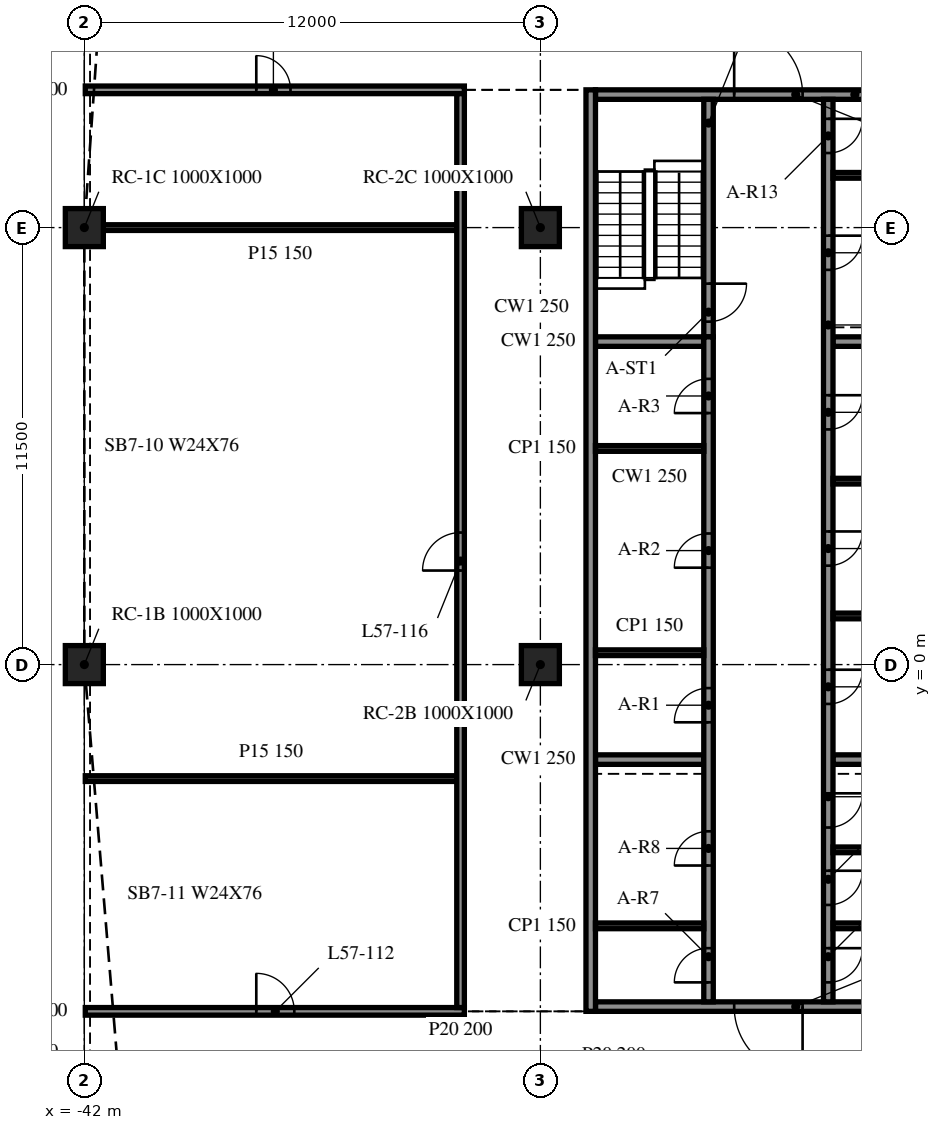
"""IFC4 building model, lengths in metres.
Left out: names, types, materials, properties, quantities, classifications, styles, units other than length and angle.
Written with IfcOpenShell. Run it as: python <this file> out.ifc"""

import sys

from ifc_helpers import new_model, si_unit, direction, frame, frame_2d, origin, origin_2d, place, context, subcontext, project, spatial, rectangle, extrude, element, fill, save


model = new_model("IFC4")
c1 = context("Model", 3, precision=1e-05, world=origin(), true_north=direction((0.0, 1.0)))
c2 = subcontext(c1, "Body", "Model", "MODEL_VIEW")
j1 = project(units=[si_unit("LENGTHUNIT", "METRE"), si_unit("PLANEANGLEUNIT", "RADIAN")], contexts=[c1])
p1 = place(None, origin())
s1 = spatial("IfcSite", under=j1, at=p1, CompositionType="ELEMENT")
p2 = place(p1, origin())
s2 = spatial("IfcBuilding", under=s1, at=p2, CompositionType="ELEMENT")
p3 = place(p2, frame((0.0, 0.0, 236.2)))
s3 = spatial("IfcBuildingStorey", under=s2, at=p3, CompositionType="ELEMENT", Elevation=236.2)
for number, where, z_axis, x_axis in (
    (1, (-42.0, 0.0, -0.34), (0.0, 0.0, 1.0), (1.0, 0.0, 0.0)),
    (2, (-42.0, 11.5, -0.34), (0.0, 0.0, 1.0), (1.0, 0.0, 0.0)),
    (3, (-30.0, 0.0, -0.34), (0.0, 0.0, 1.0), (1.0, 0.0, 0.0)),
    (4, (-30.0, 11.5, -0.34), (0.0, 0.0, 1.0), (1.0, 0.0, 0.0)),
):
    element("IfcColumn", number, at=place(p3, frame(where, z_axis=z_axis, x_axis=x_axis)), inside=s3, PredefinedType="COLUMN", context=c2, shape_type="SweptSolid", body=[
        extrude(rectangle(XDim=1.0, YDim=1.0, at=origin_2d()), origin(), (0.0, 0.0, 1.0), 3.8),
    ])
p4 = place(p3, frame((-28.675, 15.125, 0.0), z_axis=(0.0, 0.0, 1.0), x_axis=(0.0, -1.0, 0.0)))
e5 = element("IfcWall", 5, at=p4, inside=s3, PredefinedType="SOLIDWALL", context=c2, shape_type="SweptSolid", body=[
    extrude(rectangle(XDim=24.25, YDim=0.25, at=frame_2d((12.125, 0.0))), origin(), (0.0, 0.0, 1.0), 3.46),
])
p5 = place(p3, frame((-19.45, -9.0, 0.0), z_axis=(0.0, 0.0, 1.0), x_axis=(-1.0, 0.0, 0.0)))
e6 = element("IfcWall", 6, at=p5, inside=s3, PredefinedType="SOLIDWALL", context=c2, shape_type="SweptSolid", body=[
    extrude(rectangle(XDim=9.1, YDim=0.25, at=frame_2d((4.55, 0.0))), origin(), (0.0, 0.0, 1.0), 3.46),
])
p6 = place(p5, frame((3.65, 0.0, 0.0)))
e7 = element("IfcOpeningElement", 7, at=p6, cuts=e6, PredefinedType="OPENING", context=c2, shape_type="SweptSolid", body=[
    extrude(rectangle(XDim=1.8, YDim=2.1, at=frame_2d((0.9, 1.05))), frame((0.0, 0.135, 0.0), z_axis=(0.0, -1.0, 0.0), x_axis=(1.0, 0.0, 0.0)), (0.0, 0.0, 1.0), 0.27),
])
p7 = place(p3, frame((-28.55, 15.0, 0.0), z_axis=(0.0, 0.0, 1.0), x_axis=(1.0, 0.0, 0.0)))
e8 = element("IfcWall", 8, at=p7, inside=s3, PredefinedType="SOLIDWALL", context=c2, shape_type="SweptSolid", body=[
    extrude(rectangle(XDim=9.1, YDim=0.25, at=frame_2d((4.55, 0.0))), origin(), (0.0, 0.0, 1.0), 3.46),
])
p8 = place(p7, frame((3.65, 0.0, 0.0)))
e9 = element("IfcOpeningElement", 9, at=p8, cuts=e8, PredefinedType="OPENING", context=c2, shape_type="SweptSolid", body=[
    extrude(rectangle(XDim=1.8, YDim=2.1, at=frame_2d((0.9, 1.05))), frame((0.0, 0.135, 0.0), z_axis=(0.0, -1.0, 0.0), x_axis=(1.0, 0.0, 0.0)), (0.0, 0.0, 1.0), 0.27),
])
p9 = place(p3, frame((-25.575, -8.875, 0.0), z_axis=(0.0, 0.0, 1.0), x_axis=(0.0, 1.0, 0.0)))
e10 = element("IfcWall", 10, at=p9, inside=s3, PredefinedType="SOLIDWALL", context=c2, shape_type="SweptSolid", body=[
    extrude(rectangle(XDim=17.5, YDim=0.25, at=frame_2d((8.75, 0.0))), origin(), (0.0, 0.0, 1.0), 3.46),
])
p10 = place(p9, frame((7.356, 0.0, 0.0)))
e11 = element("IfcOpeningElement", 11, at=p10, cuts=e10, PredefinedType="OPENING", context=c2, shape_type="SweptSolid", body=[
    extrude(rectangle(XDim=0.9, YDim=2.1, at=frame_2d((0.45, 1.05))), frame((0.0, 0.135, 0.0), z_axis=(0.0, -1.0, 0.0), x_axis=(1.0, 0.0, 0.0)), (0.0, 0.0, 1.0), 0.27),
])
p11 = place(p9, frame((11.425, 0.0, 0.0)))
e12 = element("IfcOpeningElement", 12, at=p11, cuts=e10, PredefinedType="OPENING", context=c2, shape_type="SweptSolid", body=[
    extrude(rectangle(XDim=0.9, YDim=2.1, at=frame_2d((0.45, 1.05))), frame((0.0, 0.135, 0.0), z_axis=(0.0, -1.0, 0.0), x_axis=(1.0, 0.0, 0.0)), (0.0, 0.0, 1.0), 0.27),
])
p12 = place(p9, frame((15.494, 0.0, 0.0)))
e13 = element("IfcOpeningElement", 13, at=p12, cuts=e10, PredefinedType="OPENING", context=c2, shape_type="SweptSolid", body=[
    extrude(rectangle(XDim=0.9, YDim=2.1, at=frame_2d((0.45, 1.05))), frame((0.0, 0.135, 0.0), z_axis=(0.0, -1.0, 0.0), x_axis=(1.0, 0.0, 0.0)), (0.0, 0.0, 1.0), 0.27),
])
p13 = place(p9, frame((0.512, 0.0, 0.0)))
e14 = element("IfcOpeningElement", 14, at=p13, cuts=e10, PredefinedType="OPENING", context=c2, shape_type="SweptSolid", body=[
    extrude(rectangle(XDim=0.9, YDim=2.1, at=frame_2d((0.45, 1.05))), frame((0.0, 0.135, 0.0), z_axis=(0.0, -1.0, 0.0), x_axis=(1.0, 0.0, 0.0)), (0.0, 0.0, 1.0), 0.27),
])
p14 = place(p9, frame((3.587, 0.0, 0.0)))
e15 = element("IfcOpeningElement", 15, at=p14, cuts=e10, PredefinedType="OPENING", context=c2, shape_type="SweptSolid", body=[
    extrude(rectangle(XDim=0.9, YDim=2.1, at=frame_2d((0.45, 1.05))), frame((0.0, 0.135, 0.0), z_axis=(0.0, -1.0, 0.0), x_axis=(1.0, 0.0, 0.0)), (0.0, 0.0, 1.0), 0.27),
])
p15 = place(p3, frame((-25.575, 14.875, 0.0), z_axis=(0.0, 0.0, 1.0), x_axis=(0.0, -1.0, 0.0)))
e16 = element("IfcWall", 16, at=p15, inside=s3, PredefinedType="SOLIDWALL", context=c2, shape_type="SweptSolid", body=[
    extrude(rectangle(XDim=6.25, YDim=0.25, at=frame_2d((3.125, 0.0))), origin(), (0.0, 0.0, 1.0), 3.46),
])
p16 = place(p15, frame((4.85, 0.0, 0.0)))
e17 = element("IfcOpeningElement", 17, at=p16, cuts=e16, PredefinedType="OPENING", context=c2, shape_type="SweptSolid", body=[
    extrude(rectangle(XDim=1.0, YDim=2.1, at=frame_2d((0.5, 1.05))), frame((0.0, 0.135, 0.0), z_axis=(0.0, -1.0, 0.0), x_axis=(1.0, 0.0, 0.0)), (0.0, 0.0, 1.0), 0.27),
])
p17 = place(p3, frame((-22.425, 14.875, 0.0), z_axis=(0.0, 0.0, 1.0), x_axis=(0.0, -1.0, 0.0)))
e18 = element("IfcWall", 18, at=p17, inside=s3, PredefinedType="SOLIDWALL", context=c2, shape_type="SweptSolid", body=[
    extrude(rectangle(XDim=23.75, YDim=0.25, at=frame_2d((11.875, 0.0))), origin(), (0.0, 0.0, 1.0), 3.46),
])
p18 = place(p17, frame((15.01, 0.0, 0.0)))
e19 = element("IfcOpeningElement", 19, at=p18, cuts=e18, PredefinedType="OPENING", context=c2, shape_type="SweptSolid", body=[
    extrude(rectangle(XDim=0.9, YDim=2.1, at=frame_2d((0.45, 1.05))), frame((0.0, 0.135, 0.0), z_axis=(0.0, -1.0, 0.0), x_axis=(1.0, 0.0, 0.0)), (0.0, 0.0, 1.0), 0.27),
])
p19 = place(p17, frame((11.371, 0.0, 0.0)))
e20 = element("IfcOpeningElement", 20, at=p19, cuts=e18, PredefinedType="OPENING", context=c2, shape_type="SweptSolid", body=[
    extrude(rectangle(XDim=0.9, YDim=2.1, at=frame_2d((0.45, 1.05))), frame((0.0, 0.135, 0.0), z_axis=(0.0, -1.0, 0.0), x_axis=(1.0, 0.0, 0.0)), (0.0, 0.0, 1.0), 0.27),
])
p20 = place(p17, frame((7.786, 0.0, 0.0)))
e21 = element("IfcOpeningElement", 21, at=p20, cuts=e18, PredefinedType="OPENING", context=c2, shape_type="SweptSolid", body=[
    extrude(rectangle(XDim=0.9, YDim=2.1, at=frame_2d((0.45, 1.05))), frame((0.0, 0.135, 0.0), z_axis=(0.0, -1.0, 0.0), x_axis=(1.0, 0.0, 0.0)), (0.0, 0.0, 1.0), 0.27),
])
p21 = place(p17, frame((22.337, 0.0, 0.0)))
e22 = element("IfcOpeningElement", 22, at=p21, cuts=e18, PredefinedType="OPENING", context=c2, shape_type="SweptSolid", body=[
    extrude(rectangle(XDim=0.9, YDim=2.1, at=frame_2d((0.45, 1.05))), frame((0.0, 0.135, 0.0), z_axis=(0.0, -1.0, 0.0), x_axis=(1.0, 0.0, 0.0)), (0.0, 0.0, 1.0), 0.27),
])
p22 = place(p17, frame((20.3, 0.0, 0.0)))
e23 = element("IfcOpeningElement", 23, at=p22, cuts=e18, PredefinedType="OPENING", context=c2, shape_type="SweptSolid", body=[
    extrude(rectangle(XDim=0.9, YDim=2.1, at=frame_2d((0.45, 1.05))), frame((0.0, 0.135, 0.0), z_axis=(0.0, -1.0, 0.0), x_axis=(1.0, 0.0, 0.0)), (0.0, 0.0, 1.0), 0.27),
])
p23 = place(p17, frame((18.262, 0.0, 0.0)))
e24 = element("IfcOpeningElement", 24, at=p23, cuts=e18, PredefinedType="OPENING", context=c2, shape_type="SweptSolid", body=[
    extrude(rectangle(XDim=0.9, YDim=2.1, at=frame_2d((0.45, 1.05))), frame((0.0, 0.135, 0.0), z_axis=(0.0, -1.0, 0.0), x_axis=(1.0, 0.0, 0.0)), (0.0, 0.0, 1.0), 0.27),
])
p24 = place(p17, frame((3.587, 0.0, 0.0)))
e25 = element("IfcOpeningElement", 25, at=p24, cuts=e18, PredefinedType="OPENING", context=c2, shape_type="SweptSolid", body=[
    extrude(rectangle(XDim=0.9, YDim=2.1, at=frame_2d((0.45, 1.05))), frame((0.0, 0.135, 0.0), z_axis=(0.0, -1.0, 0.0), x_axis=(1.0, 0.0, 0.0)), (0.0, 0.0, 1.0), 0.27),
])
p25 = place(p17, frame((0.512, 0.0, 0.0)))
e26 = element("IfcOpeningElement", 26, at=p25, cuts=e18, PredefinedType="OPENING", context=c2, shape_type="SweptSolid", body=[
    extrude(rectangle(XDim=0.9, YDim=2.1, at=frame_2d((0.45, 1.05))), frame((0.0, 0.135, 0.0), z_axis=(0.0, -1.0, 0.0), x_axis=(1.0, 0.0, 0.0)), (0.0, 0.0, 1.0), 0.27),
])
for number, where, z_axis, x_axis in (
    (27, (-28.55, -2.5, 0.0), (0.0, 0.0, 1.0), (1.0, 0.0, 0.0)),
    (28, (-28.55, 8.5, 0.0), (0.0, 0.0, 1.0), (1.0, 0.0, 0.0)),
    (29, (-22.3, -2.5, 0.0), (0.0, 0.0, 1.0), (1.0, 0.0, 0.0)),
    (30, (-22.3, 8.5, 0.0), (0.0, 0.0, 1.0), (1.0, 0.0, 0.0)),
):
    element("IfcWall", number, at=place(p3, frame(where, z_axis=z_axis, x_axis=x_axis)), inside=s3, PredefinedType="SOLIDWALL", context=c2, shape_type="SweptSolid", body=[
        extrude(rectangle(XDim=2.85, YDim=0.25, at=frame_2d((1.425, 0.0))), origin(), (0.0, 0.0, 1.0), 3.46),
    ])
for number, where, z_axis, x_axis in (
    (31, (-28.55, 0.312, 0.0), (0.0, 0.0, 1.0), (1.0, 0.0, 0.0)),
    (32, (-28.55, 5.688, 0.0), (0.0, 0.0, 1.0), (1.0, 0.0, 0.0)),
    (33, (-22.3, 1.28, 0.0), (0.0, 0.0, 1.0), (1.0, 0.0, 0.0)),
    (34, (-22.3, 4.827, 0.0), (0.0, 0.0, 1.0), (1.0, 0.0, 0.0)),
    (35, (-28.55, -6.875, 0.0), (0.0, 0.0, 1.0), (1.0, 0.0, 0.0)),
    (36, (-22.3, -6.875, 0.0), (0.0, 0.0, 1.0), (1.0, 0.0, 0.0)),
    (37, (-22.3, -4.875, 0.0), (0.0, 0.0, 1.0), (1.0, 0.0, 0.0)),
    (38, (-22.3, 12.875, 0.0), (0.0, 0.0, 1.0), (1.0, 0.0, 0.0)),
):
    element("IfcWall", number, at=place(p3, frame(where, z_axis=z_axis, x_axis=x_axis)), inside=s3, PredefinedType="PARTITIONING", context=c2, shape_type="SweptSolid", body=[
        extrude(rectangle(XDim=2.85, YDim=0.15, at=frame_2d((1.425, 0.0))), origin(), (0.0, 0.0, 1.0), 3.46),
    ])
p26 = place(p3, frame((-41.975, -9.125, 0.0), z_axis=(0.0, 0.0, 1.0), x_axis=(1.0, 0.0, 0.0)))
e39 = element("IfcWall", 39, at=p26, inside=s3, PredefinedType="PARTITIONING", context=c2, shape_type="SweptSolid", body=[
    extrude(rectangle(XDim=9.975, YDim=0.2, at=frame_2d((4.988, 0.0))), origin(), (0.0, 0.0, 1.0), 3.46),
])
p27 = place(p26, frame((4.5, 0.0, 0.0)))
e40 = element("IfcOpeningElement", 40, at=p27, cuts=e39, PredefinedType="OPENING", context=c2, shape_type="SweptSolid", body=[
    extrude(rectangle(XDim=1.0, YDim=2.1, at=frame_2d((0.5, 1.05))), frame((0.0, 0.11, 0.0), z_axis=(0.0, -1.0, 0.0), x_axis=(1.0, 0.0, 0.0)), (0.0, 0.0, 1.0), 0.22),
])
p28 = place(p3, frame((-41.975, -3.0, 0.0), z_axis=(0.0, 0.0, 1.0), x_axis=(1.0, 0.0, 0.0)))
e41 = element("IfcWall", 41, at=p28, inside=s3, PredefinedType="PARTITIONING", context=c2, shape_type="SweptSolid", body=[
    extrude(rectangle(XDim=9.775, YDim=0.15, at=frame_2d((4.888, 0.0))), origin(), (0.0, 0.0, 1.0), 3.46),
])
p29 = place(p3, frame((-41.5, 11.5, 0.0), z_axis=(0.0, 0.0, 1.0), x_axis=(1.0, 0.0, 0.0)))
e42 = element("IfcWall", 42, at=p29, inside=s3, PredefinedType="PARTITIONING", context=c2, shape_type="SweptSolid", body=[
    extrude(rectangle(XDim=9.3, YDim=0.15, at=frame_2d((4.65, 0.0))), origin(), (0.0, 0.0, 1.0), 3.46),
])
p30 = place(p3, frame((-41.975, 15.125, 0.0), z_axis=(0.0, 0.0, 1.0), x_axis=(1.0, 0.0, 0.0)))
e43 = element("IfcWall", 43, at=p30, inside=s3, PredefinedType="PARTITIONING", context=c2, shape_type="SweptSolid", body=[
    extrude(rectangle(XDim=9.975, YDim=0.2, at=frame_2d((4.988, 0.0))), origin(), (0.0, 0.0, 1.0), 3.46),
])
p31 = place(p30, frame((4.5, 0.0, 0.0)))
e44 = element("IfcOpeningElement", 44, at=p31, cuts=e43, PredefinedType="OPENING", context=c2, shape_type="SweptSolid", body=[
    extrude(rectangle(XDim=0.9, YDim=2.1, at=frame_2d((0.45, 1.05))), frame((0.0, 0.11, 0.0), z_axis=(0.0, -1.0, 0.0), x_axis=(1.0, 0.0, 0.0)), (0.0, 0.0, 1.0), 0.22),
])
p32 = place(p3, frame((-32.1, -9.025, 0.0), z_axis=(0.0, 0.0, 1.0), x_axis=(0.0, 1.0, 0.0)))
e45 = element("IfcWall", 45, at=p32, inside=s3, PredefinedType="PARTITIONING", context=c2, shape_type="SweptSolid", body=[
    extrude(rectangle(XDim=24.05, YDim=0.2, at=frame_2d((12.025, 0.0))), origin(), (0.0, 0.0, 1.0), 3.46),
])
p33 = place(p32, frame((11.5, 0.0, 0.0)))
e46 = element("IfcOpeningElement", 46, at=p33, cuts=e45, PredefinedType="OPENING", context=c2, shape_type="SweptSolid", body=[
    extrude(rectangle(XDim=1.0, YDim=2.1, at=frame_2d((0.5, 1.05))), frame((0.0, 0.11, 0.0), z_axis=(0.0, -1.0, 0.0), x_axis=(1.0, 0.0, 0.0)), (0.0, 0.0, 1.0), 0.22),
])
p34 = place(p6, origin())
e47 = element("IfcDoor", 47, at=p34, inside=s3, OperationType="DOUBLE_DOOR_SINGLE_SWING", PredefinedType="DOOR", context=c2, shape_type="SweptSolid", body=[
    extrude(rectangle(XDim=1.8, YDim=2.1, at=frame_2d((0.9, 1.05))), frame((0.0, 0.025, 0.0), z_axis=(0.0, -1.0, 0.0), x_axis=(1.0, 0.0, 0.0)), (0.0, 0.0, 1.0), 0.05),
])
fill(e7, e47)
p35 = place(p8, origin())
e48 = element("IfcDoor", 48, at=p35, inside=s3, OperationType="DOUBLE_DOOR_SINGLE_SWING", PredefinedType="DOOR", context=c2, shape_type="SweptSolid", body=[
    extrude(rectangle(XDim=1.8, YDim=2.1, at=frame_2d((0.9, 1.05))), frame((0.0, 0.025, 0.0), z_axis=(0.0, -1.0, 0.0), x_axis=(1.0, 0.0, 0.0)), (0.0, 0.0, 1.0), 0.05),
])
fill(e9, e48)
p36 = place(p10, origin())
e49 = element("IfcDoor", 49, at=p36, inside=s3, OperationType="SINGLE_SWING_LEFT", PredefinedType="DOOR", context=c2, shape_type="SweptSolid", body=[
    extrude(rectangle(XDim=0.9, YDim=2.1, at=frame_2d((0.45, 1.05))), frame((0.0, 0.025, 0.0), z_axis=(0.0, -1.0, 0.0), x_axis=(1.0, 0.0, 0.0)), (0.0, 0.0, 1.0), 0.05),
])
fill(e11, e49)
p37 = place(p11, origin())
e50 = element("IfcDoor", 50, at=p37, inside=s3, OperationType="SINGLE_SWING_RIGHT", PredefinedType="DOOR", context=c2, shape_type="SweptSolid", body=[
    extrude(rectangle(XDim=0.9, YDim=2.1, at=frame_2d((0.45, 1.05))), frame((0.0, 0.025, 0.0), z_axis=(0.0, -1.0, 0.0), x_axis=(1.0, 0.0, 0.0)), (0.0, 0.0, 1.0), 0.05),
])
fill(e12, e50)
p38 = place(p12, origin())
e51 = element("IfcDoor", 51, at=p38, inside=s3, OperationType="SINGLE_SWING_LEFT", PredefinedType="DOOR", context=c2, shape_type="SweptSolid", body=[
    extrude(rectangle(XDim=0.9, YDim=2.1, at=frame_2d((0.45, 1.05))), frame((0.0, 0.025, 0.0), z_axis=(0.0, -1.0, 0.0), x_axis=(1.0, 0.0, 0.0)), (0.0, 0.0, 1.0), 0.05),
])
fill(e13, e51)
p39 = place(p18, origin())
e52 = element("IfcDoor", 52, at=p39, inside=s3, OperationType="SINGLE_SWING_RIGHT", PredefinedType="DOOR", context=c2, shape_type="SweptSolid", body=[
    extrude(rectangle(XDim=0.9, YDim=2.1, at=frame_2d((0.45, 1.05))), frame((0.0, 0.025, 0.0), z_axis=(0.0, -1.0, 0.0), x_axis=(1.0, 0.0, 0.0)), (0.0, 0.0, 1.0), 0.05),
])
fill(e19, e52)
p40 = place(p19, origin())
e53 = element("IfcDoor", 53, at=p40, inside=s3, OperationType="SINGLE_SWING_LEFT", PredefinedType="DOOR", context=c2, shape_type="SweptSolid", body=[
    extrude(rectangle(XDim=0.9, YDim=2.1, at=frame_2d((0.45, 1.05))), frame((0.0, 0.025, 0.0), z_axis=(0.0, -1.0, 0.0), x_axis=(1.0, 0.0, 0.0)), (0.0, 0.0, 1.0), 0.05),
])
fill(e20, e53)
p41 = place(p20, origin())
e54 = element("IfcDoor", 54, at=p41, inside=s3, OperationType="SINGLE_SWING_RIGHT", PredefinedType="DOOR", context=c2, shape_type="SweptSolid", body=[
    extrude(rectangle(XDim=0.9, YDim=2.1, at=frame_2d((0.45, 1.05))), frame((0.0, 0.025, 0.0), z_axis=(0.0, -1.0, 0.0), x_axis=(1.0, 0.0, 0.0)), (0.0, 0.0, 1.0), 0.05),
])
fill(e21, e54)
p42 = place(p13, origin())
e55 = element("IfcDoor", 55, at=p42, inside=s3, OperationType="SINGLE_SWING_LEFT", PredefinedType="DOOR", context=c2, shape_type="SweptSolid", body=[
    extrude(rectangle(XDim=0.9, YDim=2.1, at=frame_2d((0.45, 1.05))), frame((0.0, 0.025, 0.0), z_axis=(0.0, -1.0, 0.0), x_axis=(1.0, 0.0, 0.0)), (0.0, 0.0, 1.0), 0.05),
])
fill(e14, e55)
p43 = place(p14, origin())
e56 = element("IfcDoor", 56, at=p43, inside=s3, OperationType="SINGLE_SWING_RIGHT", PredefinedType="DOOR", context=c2, shape_type="SweptSolid", body=[
    extrude(rectangle(XDim=0.9, YDim=2.1, at=frame_2d((0.45, 1.05))), frame((0.0, 0.025, 0.0), z_axis=(0.0, -1.0, 0.0), x_axis=(1.0, 0.0, 0.0)), (0.0, 0.0, 1.0), 0.05),
])
fill(e15, e56)
p44 = place(p21, origin())
e57 = element("IfcDoor", 57, at=p44, inside=s3, OperationType="SINGLE_SWING_LEFT", PredefinedType="DOOR", context=c2, shape_type="SweptSolid", body=[
    extrude(rectangle(XDim=0.9, YDim=2.1, at=frame_2d((0.45, 1.05))), frame((0.0, 0.025, 0.0), z_axis=(0.0, -1.0, 0.0), x_axis=(1.0, 0.0, 0.0)), (0.0, 0.0, 1.0), 0.05),
])
fill(e22, e57)
p45 = place(p22, origin())
e58 = element("IfcDoor", 58, at=p45, inside=s3, OperationType="SINGLE_SWING_RIGHT", PredefinedType="DOOR", context=c2, shape_type="SweptSolid", body=[
    extrude(rectangle(XDim=0.9, YDim=2.1, at=frame_2d((0.45, 1.05))), frame((0.0, 0.025, 0.0), z_axis=(0.0, -1.0, 0.0), x_axis=(1.0, 0.0, 0.0)), (0.0, 0.0, 1.0), 0.05),
])
fill(e23, e58)
p46 = place(p23, origin())
e59 = element("IfcDoor", 59, at=p46, inside=s3, OperationType="SINGLE_SWING_LEFT", PredefinedType="DOOR", context=c2, shape_type="SweptSolid", body=[
    extrude(rectangle(XDim=0.9, YDim=2.1, at=frame_2d((0.45, 1.05))), frame((0.0, 0.025, 0.0), z_axis=(0.0, -1.0, 0.0), x_axis=(1.0, 0.0, 0.0)), (0.0, 0.0, 1.0), 0.05),
])
fill(e24, e59)
p47 = place(p24, origin())
e60 = element("IfcDoor", 60, at=p47, inside=s3, OperationType="SINGLE_SWING_RIGHT", PredefinedType="DOOR", context=c2, shape_type="SweptSolid", body=[
    extrude(rectangle(XDim=0.9, YDim=2.1, at=frame_2d((0.45, 1.05))), frame((0.0, 0.025, 0.0), z_axis=(0.0, -1.0, 0.0), x_axis=(1.0, 0.0, 0.0)), (0.0, 0.0, 1.0), 0.05),
])
fill(e25, e60)
p48 = place(p25, origin())
e61 = element("IfcDoor", 61, at=p48, inside=s3, OperationType="SINGLE_SWING_LEFT", PredefinedType="DOOR", context=c2, shape_type="SweptSolid", body=[
    extrude(rectangle(XDim=0.9, YDim=2.1, at=frame_2d((0.45, 1.05))), frame((0.0, 0.025, 0.0), z_axis=(0.0, -1.0, 0.0), x_axis=(1.0, 0.0, 0.0)), (0.0, 0.0, 1.0), 0.05),
])
fill(e26, e61)
p49 = place(p16, origin())
e62 = element("IfcDoor", 62, at=p49, inside=s3, OperationType="SINGLE_SWING_RIGHT", PredefinedType="DOOR", context=c2, shape_type="SweptSolid", body=[
    extrude(rectangle(XDim=1.0, YDim=2.1, at=frame_2d((0.5, 1.05))), frame((0.0, 0.025, 0.0), z_axis=(0.0, -1.0, 0.0), x_axis=(1.0, 0.0, 0.0)), (0.0, 0.0, 1.0), 0.05),
])
fill(e17, e62)
p50 = place(p27, origin())
e63 = element("IfcDoor", 63, at=p50, inside=s3, OperationType="SINGLE_SWING_RIGHT", PredefinedType="DOOR", context=c2, shape_type="SweptSolid", body=[
    extrude(rectangle(XDim=1.0, YDim=2.1, at=frame_2d((0.5, 1.05))), frame((0.0, 0.025, 0.0), z_axis=(0.0, -1.0, 0.0), x_axis=(1.0, 0.0, 0.0)), (0.0, 0.0, 1.0), 0.05),
])
fill(e40, e63)
p51 = place(p33, origin())
e64 = element("IfcDoor", 64, at=p51, inside=s3, OperationType="SINGLE_SWING_LEFT", PredefinedType="DOOR", context=c2, shape_type="SweptSolid", body=[
    extrude(rectangle(XDim=1.0, YDim=2.1, at=frame_2d((0.5, 1.05))), frame((0.0, 0.025, 0.0), z_axis=(0.0, -1.0, 0.0), x_axis=(1.0, 0.0, 0.0)), (0.0, 0.0, 1.0), 0.05),
])
fill(e46, e64)
p52 = place(p31, origin())
e65 = element("IfcDoor", 65, at=p52, inside=s3, OperationType="SINGLE_SWING_LEFT", PredefinedType="DOOR", context=c2, shape_type="SweptSolid", body=[
    extrude(rectangle(XDim=0.9, YDim=2.1, at=frame_2d((0.45, 1.05))), frame((0.0, 0.025, 0.0), z_axis=(0.0, -1.0, 0.0), x_axis=(1.0, 0.0, 0.0)), (0.0, 0.0, 1.0), 0.05),
])
fill(e44, e65)
save(model, sys.argv[1])
